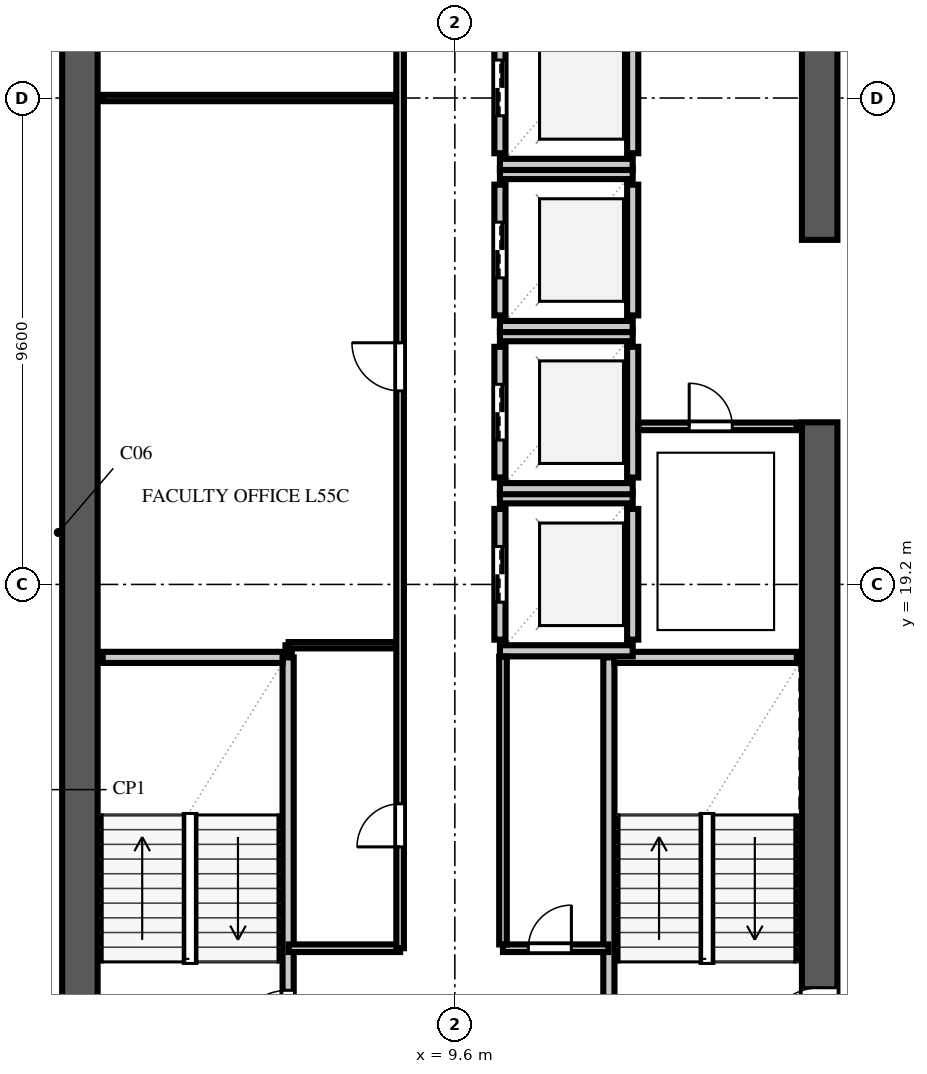
"""IFC4 building model, lengths in metres.
Left out: names, types, materials, properties, quantities, classifications, styles, units other than length and angle.
Written with IfcOpenShell. Run it as: python <this file> out.ifc"""

import sys

from ifc_helpers import new_model, si_unit, direction, frame, frame_2d, origin, place, context, subcontext, project, spatial, rectangle, extrude, element, fill, save


model = new_model("IFC4")
c1 = context("Model", 3, precision=1e-05, world=origin(), true_north=direction((0.0, 1.0)))
c2 = subcontext(c1, "Body", "Model", "MODEL_VIEW")
j1 = project(units=[si_unit("LENGTHUNIT", "METRE"), si_unit("PLANEANGLEUNIT", "RADIAN")], contexts=[c1])
p1 = place(None, origin())
s1 = spatial("IfcSite", under=j1, at=p1, CompositionType="ELEMENT")
p2 = place(p1, origin())
s2 = spatial("IfcBuilding", under=s1, at=p2, CompositionType="ELEMENT")
p3 = place(p2, frame((0.0, 0.0, 218.0)))
s3 = spatial("IfcBuildingStorey", under=s2, at=p3, CompositionType="ELEMENT", Elevation=218.0)
p4 = place(p3, frame((2.2, 9.25, 0.0), z_axis=(0.0, 0.0, 1.0), x_axis=(0.0, 1.0, 0.0)))
e1 = element("IfcWall", 1, at=p4, inside=s3, PredefinedType="SHEAR", context=c2, shape_type="SweptSolid", body=[
    extrude(rectangle(XDim=39.1, YDim=0.7, at=frame_2d((19.55, 0.0))), origin(), (0.0, 0.0, 1.0), 3.54),
])
p5 = place(p3, frame((16.8, 9.95, 0.0), z_axis=(0.0, 0.0, 1.0), x_axis=(0.0, 1.0, 0.0)))
e2 = element("IfcWall", 2, at=p5, inside=s3, PredefinedType="SHEAR", context=c2, shape_type="SweptSolid", body=[
    extrude(rectangle(XDim=12.45, YDim=0.7, at=frame_2d((6.225, 0.0))), origin(), (0.0, 0.0, 1.0), 3.54),
])
p6 = place(p5, frame((0.19, 0.0, 0.0)))
e3 = element("IfcOpeningElement", 3, at=p6, cuts=e2, PredefinedType="OPENING", context=c2, shape_type="SweptSolid", body=[
    extrude(rectangle(XDim=1.1, YDim=2.2, at=frame_2d((0.55, 1.1))), frame((0.0, 0.362, 0.0), z_axis=(0.0, -1.0, 0.0), x_axis=(1.0, 0.0, 0.0)), (0.0, 0.0, 1.0), 0.724),
])
p7 = place(p3, frame((16.8, 26.0, 0.0), z_axis=(0.0, 0.0, 1.0), x_axis=(0.0, 1.0, 0.0)))
e4 = element("IfcWall", 4, at=p7, inside=s3, PredefinedType="SHEAR", context=c2, shape_type="SweptSolid", body=[
    extrude(rectangle(XDim=7.8, YDim=0.7, at=frame_2d((3.9, 0.0))), origin(), (0.0, 0.0, 1.0), 3.54),
])
p8 = place(p3, frame((6.31, 9.95, 0.0), z_axis=(0.0, 0.0, 1.0), x_axis=(0.0, 1.0, 0.0)))
e5 = element("IfcWall", 5, at=p8, inside=s3, PredefinedType="SOLIDWALL", context=c2, shape_type="SweptSolid", body=[
    extrude(rectangle(XDim=7.81, YDim=0.22, at=frame_2d((3.905, 0.0))), origin(), (0.0, 0.0, 1.0), 3.54),
])
p9 = place(p8, frame((0.14, 0.0, 0.0)))
e6 = element("IfcOpeningElement", 6, at=p9, cuts=e5, PredefinedType="OPENING", context=c2, shape_type="SweptSolid", body=[
    extrude(rectangle(XDim=1.1, YDim=2.2, at=frame_2d((0.55, 1.1))), frame((0.0, 0.122, 0.0), z_axis=(0.0, -1.0, 0.0), x_axis=(1.0, 0.0, 0.0)), (0.0, 0.0, 1.0), 0.244),
])
p10 = place(p3, frame((2.65, 17.76, 0.0), z_axis=(0.0, 0.0, 1.0), x_axis=(1.0, 0.0, 0.0)))
e7 = element("IfcWall", 7, at=p10, inside=s3, PredefinedType="SOLIDWALL", context=c2, shape_type="SweptSolid", body=[
    extrude(rectangle(XDim=3.55, YDim=0.22, at=frame_2d((1.775, 0.0))), origin(), (0.0, 0.0, 1.0), 3.54),
])
p11 = place(p3, frame((12.64, 10.05, 0.0), z_axis=(0.0, 0.0, 1.0), x_axis=(0.0, 1.0, 0.0)))
e8 = element("IfcWall", 8, at=p11, inside=s3, PredefinedType="SOLIDWALL", context=c2, shape_type="SweptSolid", body=[
    extrude(rectangle(XDim=7.71, YDim=0.22, at=frame_2d((3.855, 0.0))), origin(), (0.0, 0.0, 1.0), 3.54),
])
p12 = place(p3, frame((12.75, 17.76, 0.0), z_axis=(0.0, 0.0, 1.0), x_axis=(1.0, 0.0, 0.0)))
e9 = element("IfcWall", 9, at=p12, inside=s3, PredefinedType="SOLIDWALL", context=c2, shape_type="SweptSolid", body=[
    extrude(rectangle(XDim=3.6, YDim=0.22, at=frame_2d((1.8, 0.0))), origin(), (0.0, 0.0, 1.0), 3.54),
])
p13 = place(p3, frame((10.49, 18.11, 0.0), z_axis=(0.0, 0.0, 1.0), x_axis=(0.0, 1.0, 0.0)))
e10 = element("IfcWall", 10, at=p13, inside=s3, PredefinedType="SOLIDWALL", context=c2, shape_type="SweptSolid", body=[
    extrude(rectangle(XDim=2.58, YDim=0.22, at=frame_2d((1.29, 0.0))), origin(), (0.0, 0.0, 1.0), 3.54),
])
p14 = place(p13, frame((0.74, 0.0, 0.0)))
e11 = element("IfcOpeningElement", 11, at=p14, cuts=e10, PredefinedType="OPENING", context=c2, shape_type="SweptSolid", body=[
    extrude(rectangle(XDim=1.1, YDim=2.2, at=frame_2d((0.55, 1.1))), frame((0.0, 0.122, 0.0), z_axis=(0.0, -1.0, 0.0), x_axis=(1.0, 0.0, 0.0)), (0.0, 0.0, 1.0), 0.244),
])
p15 = place(p3, frame((13.11, 18.11, 0.0), z_axis=(0.0, 0.0, 1.0), x_axis=(0.0, 1.0, 0.0)))
e12 = element("IfcWall", 12, at=p15, inside=s3, PredefinedType="SOLIDWALL", context=c2, shape_type="SweptSolid", body=[
    extrude(rectangle(XDim=2.58, YDim=0.22, at=frame_2d((1.29, 0.0))), origin(), (0.0, 0.0, 1.0), 3.54),
])
for number, where, z_axis, x_axis in (
    (13, (10.49, 17.89, 0.0), (0.0, 0.0, 1.0), (1.0, 0.0, 0.0)),
    (14, (10.49, 20.91, 0.0), (0.0, 0.0, 1.0), (1.0, 0.0, 0.0)),
):
    element("IfcWall", number, at=place(p3, frame(where, z_axis=z_axis, x_axis=x_axis)), inside=s3, PredefinedType="SOLIDWALL", context=c2, shape_type="SweptSolid", body=[
        extrude(rectangle(XDim=2.62, YDim=0.22, at=frame_2d((1.31, 0.0))), origin(), (0.0, 0.0, 1.0), 3.54),
    ])
p16 = place(p3, frame((10.49, 21.31, 0.0), z_axis=(0.0, 0.0, 1.0), x_axis=(0.0, 1.0, 0.0)))
e15 = element("IfcWall", 15, at=p16, inside=s3, PredefinedType="SOLIDWALL", context=c2, shape_type="SweptSolid", body=[
    extrude(rectangle(XDim=2.58, YDim=0.22, at=frame_2d((1.29, 0.0))), origin(), (0.0, 0.0, 1.0), 3.54),
])
p17 = place(p16, frame((0.74, 0.0, 0.0)))
e16 = element("IfcOpeningElement", 16, at=p17, cuts=e15, PredefinedType="OPENING", context=c2, shape_type="SweptSolid", body=[
    extrude(rectangle(XDim=1.1, YDim=2.2, at=frame_2d((0.55, 1.1))), frame((0.0, 0.122, 0.0), z_axis=(0.0, -1.0, 0.0), x_axis=(1.0, 0.0, 0.0)), (0.0, 0.0, 1.0), 0.244),
])
p18 = place(p3, frame((13.11, 21.31, 0.0), z_axis=(0.0, 0.0, 1.0), x_axis=(0.0, 1.0, 0.0)))
e17 = element("IfcWall", 17, at=p18, inside=s3, PredefinedType="SOLIDWALL", context=c2, shape_type="SweptSolid", body=[
    extrude(rectangle(XDim=2.58, YDim=0.22, at=frame_2d((1.29, 0.0))), origin(), (0.0, 0.0, 1.0), 3.54),
])
for number, where, z_axis, x_axis in (
    (18, (10.49, 21.09, 0.0), (0.0, 0.0, 1.0), (1.0, 0.0, 0.0)),
    (19, (10.49, 24.11, 0.0), (0.0, 0.0, 1.0), (1.0, 0.0, 0.0)),
):
    element("IfcWall", number, at=place(p3, frame(where, z_axis=z_axis, x_axis=x_axis)), inside=s3, PredefinedType="SOLIDWALL", context=c2, shape_type="SweptSolid", body=[
        extrude(rectangle(XDim=2.62, YDim=0.22, at=frame_2d((1.31, 0.0))), origin(), (0.0, 0.0, 1.0), 3.54),
    ])
p19 = place(p3, frame((10.49, 24.51, 0.0), z_axis=(0.0, 0.0, 1.0), x_axis=(0.0, 1.0, 0.0)))
e20 = element("IfcWall", 20, at=p19, inside=s3, PredefinedType="SOLIDWALL", context=c2, shape_type="SweptSolid", body=[
    extrude(rectangle(XDim=2.58, YDim=0.22, at=frame_2d((1.29, 0.0))), origin(), (0.0, 0.0, 1.0), 3.54),
])
p20 = place(p19, frame((0.74, 0.0, 0.0)))
e21 = element("IfcOpeningElement", 21, at=p20, cuts=e20, PredefinedType="OPENING", context=c2, shape_type="SweptSolid", body=[
    extrude(rectangle(XDim=1.1, YDim=2.2, at=frame_2d((0.55, 1.1))), frame((0.0, 0.122, 0.0), z_axis=(0.0, -1.0, 0.0), x_axis=(1.0, 0.0, 0.0)), (0.0, 0.0, 1.0), 0.244),
])
p21 = place(p3, frame((13.11, 24.51, 0.0), z_axis=(0.0, 0.0, 1.0), x_axis=(0.0, 1.0, 0.0)))
e22 = element("IfcWall", 22, at=p21, inside=s3, PredefinedType="SOLIDWALL", context=c2, shape_type="SweptSolid", body=[
    extrude(rectangle(XDim=2.58, YDim=0.22, at=frame_2d((1.29, 0.0))), origin(), (0.0, 0.0, 1.0), 3.54),
])
for number, where, z_axis, x_axis in (
    (23, (10.49, 24.29, 0.0), (0.0, 0.0, 1.0), (1.0, 0.0, 0.0)),
    (24, (10.49, 27.31, 0.0), (0.0, 0.0, 1.0), (1.0, 0.0, 0.0)),
):
    element("IfcWall", number, at=place(p3, frame(where, z_axis=z_axis, x_axis=x_axis)), inside=s3, PredefinedType="SOLIDWALL", context=c2, shape_type="SweptSolid", body=[
        extrude(rectangle(XDim=2.62, YDim=0.22, at=frame_2d((1.31, 0.0))), origin(), (0.0, 0.0, 1.0), 3.54),
    ])
p22 = place(p3, frame((10.49, 27.71, 0.0), z_axis=(0.0, 0.0, 1.0), x_axis=(0.0, 1.0, 0.0)))
e25 = element("IfcWall", 25, at=p22, inside=s3, PredefinedType="SOLIDWALL", context=c2, shape_type="SweptSolid", body=[
    extrude(rectangle(XDim=2.58, YDim=0.22, at=frame_2d((1.29, 0.0))), origin(), (0.0, 0.0, 1.0), 3.54),
])
p23 = place(p22, frame((0.74, 0.0, 0.0)))
e26 = element("IfcOpeningElement", 26, at=p23, cuts=e25, PredefinedType="OPENING", context=c2, shape_type="SweptSolid", body=[
    extrude(rectangle(XDim=1.1, YDim=2.2, at=frame_2d((0.55, 1.1))), frame((0.0, 0.122, 0.0), z_axis=(0.0, -1.0, 0.0), x_axis=(1.0, 0.0, 0.0)), (0.0, 0.0, 1.0), 0.244),
])
p24 = place(p3, frame((13.11, 27.71, 0.0), z_axis=(0.0, 0.0, 1.0), x_axis=(0.0, 1.0, 0.0)))
e27 = element("IfcWall", 27, at=p24, inside=s3, PredefinedType="SOLIDWALL", context=c2, shape_type="SweptSolid", body=[
    extrude(rectangle(XDim=2.58, YDim=0.22, at=frame_2d((1.29, 0.0))), origin(), (0.0, 0.0, 1.0), 3.54),
])
p25 = place(p3, frame((10.49, 27.49, 0.0), z_axis=(0.0, 0.0, 1.0), x_axis=(1.0, 0.0, 0.0)))
e28 = element("IfcWall", 28, at=p25, inside=s3, PredefinedType="SOLIDWALL", context=c2, shape_type="SweptSolid", body=[
    extrude(rectangle(XDim=2.62, YDim=0.22, at=frame_2d((1.31, 0.0))), origin(), (0.0, 0.0, 1.0), 3.54),
])
p26 = place(p3, frame((10.55, 12.02, 0.0), z_axis=(0.0, 0.0, 1.0), x_axis=(1.0, 0.0, 0.0)))
e29 = element("IfcWall", 29, at=p26, inside=s3, PredefinedType="PARTITIONING", context=c2, shape_type="SweptSolid", body=[
    extrude(rectangle(XDim=2.08, YDim=0.15, at=frame_2d((1.04, 0.0))), origin(), (0.0, 0.0, 1.0), 3.54),
])
p27 = place(p26, frame((0.5, 0.0, 0.0)))
e30 = element("IfcOpeningElement", 30, at=p27, cuts=e29, PredefinedType="OPENING", context=c2, shape_type="SweptSolid", body=[
    extrude(rectangle(XDim=0.85, YDim=2.1, at=frame_2d((0.425, 1.05))), frame((0.0, 0.087, 0.0), z_axis=(0.0, -1.0, 0.0), x_axis=(1.0, 0.0, 0.0)), (0.0, 0.0, 1.0), 0.174),
])
p28 = place(p3, frame((10.55, 12.095, 0.0), z_axis=(0.0, 0.0, 1.0), x_axis=(0.0, 1.0, 0.0)))
e31 = element("IfcWall", 31, at=p28, inside=s3, PredefinedType="PARTITIONING", context=c2, shape_type="SweptSolid", body=[
    extrude(rectangle(XDim=5.68, YDim=0.15, at=frame_2d((2.84, 0.0))), origin(), (0.0, 0.0, 1.0), 3.54),
])
p29 = place(p3, frame((13.225, 22.32, 0.0), z_axis=(0.0, 0.0, 1.0), x_axis=(1.0, 0.0, 0.0)))
e32 = element("IfcWall", 32, at=p29, inside=s3, PredefinedType="PARTITIONING", context=c2, shape_type="SweptSolid", body=[
    extrude(rectangle(XDim=3.12, YDim=0.15, at=frame_2d((1.56, 0.0))), origin(), (0.0, 0.0, 1.0), 3.54),
])
p30 = place(p29, frame((1.0, 0.0, 0.0)))
e33 = element("IfcOpeningElement", 33, at=p30, cuts=e32, PredefinedType="OPENING", context=c2, shape_type="SweptSolid", body=[
    extrude(rectangle(XDim=0.85, YDim=2.1, at=frame_2d((0.425, 1.05))), frame((0.0, 0.087, 0.0), z_axis=(0.0, -1.0, 0.0), x_axis=(1.0, 0.0, 0.0)), (0.0, 0.0, 1.0), 0.174),
])
p31 = place(p3, frame((6.32, 12.02, 0.0), z_axis=(0.0, 0.0, 1.0), x_axis=(1.0, 0.0, 0.0)))
e34 = element("IfcWall", 34, at=p31, inside=s3, PredefinedType="PARTITIONING", context=c2, shape_type="SweptSolid", body=[
    extrude(rectangle(XDim=2.2, YDim=0.15, at=frame_2d((1.1, 0.0))), origin(), (0.0, 0.0, 1.0), 3.54),
])
p32 = place(p3, frame((6.32, 17.8, 0.0), z_axis=(0.0, 0.0, 1.0), x_axis=(0.0, 1.0, 0.0)))
e35 = element("IfcWall", 35, at=p32, inside=s3, PredefinedType="PARTITIONING", context=c2, shape_type="SweptSolid", body=[
    extrude(rectangle(XDim=0.2, YDim=0.125, at=frame_2d((0.1, 0.0))), origin(), (0.0, 0.0, 1.0), 3.54),
])
p33 = place(p3, frame((6.32, 18.0, 0.0), z_axis=(0.0, 0.0, 1.0), x_axis=(1.0, 0.0, 0.0)))
e36 = element("IfcWall", 36, at=p33, inside=s3, PredefinedType="PARTITIONING", context=c2, shape_type="SweptSolid", body=[
    extrude(rectangle(XDim=2.2, YDim=0.125, at=frame_2d((1.1, 0.0))), origin(), (0.0, 0.0, 1.0), 3.54),
])
p34 = place(p3, frame((2.65, 28.8, 0.0), z_axis=(0.0, 0.0, 1.0), x_axis=(1.0, 0.0, 0.0)))
e37 = element("IfcWall", 37, at=p34, inside=s3, PredefinedType="PARTITIONING", context=c2, shape_type="SweptSolid", body=[
    extrude(rectangle(XDim=5.87, YDim=0.125, at=frame_2d((2.935, 0.0))), origin(), (0.0, 0.0, 1.0), 3.54),
])
p35 = place(p3, frame((8.52, 12.02, 0.0), z_axis=(0.0, 0.0, 1.0), x_axis=(0.0, 1.0, 0.0)))
e38 = element("IfcWall", 38, at=p35, inside=s3, PredefinedType="PARTITIONING", context=c2, shape_type="SweptSolid", body=[
    extrude(rectangle(XDim=24.76, YDim=0.15, at=frame_2d((12.38, 0.0))), origin(), (0.0, 0.0, 1.0), 3.54),
])
p36 = place(p35, frame((2.0, 0.0, 0.0)))
e39 = element("IfcOpeningElement", 39, at=p36, cuts=e38, PredefinedType="OPENING", context=c2, shape_type="SweptSolid", body=[
    extrude(rectangle(XDim=0.85, YDim=2.1, at=frame_2d((0.425, 1.05))), frame((0.0, 0.087, 0.0), z_axis=(0.0, -1.0, 0.0), x_axis=(1.0, 0.0, 0.0)), (0.0, 0.0, 1.0), 0.174),
])
p37 = place(p35, frame((11.0, 0.0, 0.0)))
e40 = element("IfcOpeningElement", 40, at=p37, cuts=e38, PredefinedType="OPENING", context=c2, shape_type="SweptSolid", body=[
    extrude(rectangle(XDim=0.95, YDim=2.15, at=frame_2d((0.475, 1.075))), frame((0.0, 0.087, 0.0), z_axis=(0.0, -1.0, 0.0), x_axis=(1.0, 0.0, 0.0)), (0.0, 0.0, 1.0), 0.174),
])
p38 = place(p35, frame((18.0, 0.0, 0.0)))
e41 = element("IfcOpeningElement", 41, at=p38, cuts=e38, PredefinedType="OPENING", context=c2, shape_type="SweptSolid", body=[
    extrude(rectangle(XDim=0.95, YDim=2.15, at=frame_2d((0.475, 1.075))), frame((0.0, 0.087, 0.0), z_axis=(0.0, -1.0, 0.0), x_axis=(1.0, 0.0, 0.0)), (0.0, 0.0, 1.0), 0.174),
])
p39 = place(p9, origin())
e42 = element("IfcDoor", 42, at=p39, inside=s3, OperationType="SINGLE_SWING_LEFT", PredefinedType="DOOR", context=c2, shape_type="SweptSolid", body=[
    extrude(rectangle(XDim=1.1, YDim=2.2, at=frame_2d((0.55, 1.1))), frame((0.0, 0.025, 0.0), z_axis=(0.0, -1.0, 0.0), x_axis=(1.0, 0.0, 0.0)), (0.0, 0.0, 1.0), 0.05),
])
fill(e6, e42)
p40 = place(p6, origin())
e43 = element("IfcDoor", 43, at=p40, inside=s3, OperationType="SINGLE_SWING_LEFT", PredefinedType="DOOR", context=c2, shape_type="SweptSolid", body=[
    extrude(rectangle(XDim=1.1, YDim=2.2, at=frame_2d((0.55, 1.1))), frame((0.0, 0.025, 0.0), z_axis=(0.0, -1.0, 0.0), x_axis=(1.0, 0.0, 0.0)), (0.0, 0.0, 1.0), 0.05),
])
fill(e3, e43)
p41 = place(p14, origin())
e44 = element("IfcDoor", 44, at=p41, inside=s3, OperationType="DOUBLE_DOOR_SLIDING", PredefinedType="DOOR", context=c2, shape_type="SweptSolid", body=[
    extrude(rectangle(XDim=1.1, YDim=2.2, at=frame_2d((0.55, 1.1))), frame((0.0, 0.025, 0.0), z_axis=(0.0, -1.0, 0.0), x_axis=(1.0, 0.0, 0.0)), (0.0, 0.0, 1.0), 0.05),
])
fill(e11, e44)
p42 = place(p17, origin())
e45 = element("IfcDoor", 45, at=p42, inside=s3, OperationType="DOUBLE_DOOR_SLIDING", PredefinedType="DOOR", context=c2, shape_type="SweptSolid", body=[
    extrude(rectangle(XDim=1.1, YDim=2.2, at=frame_2d((0.55, 1.1))), frame((0.0, 0.025, 0.0), z_axis=(0.0, -1.0, 0.0), x_axis=(1.0, 0.0, 0.0)), (0.0, 0.0, 1.0), 0.05),
])
fill(e16, e45)
p43 = place(p20, origin())
e46 = element("IfcDoor", 46, at=p43, inside=s3, OperationType="DOUBLE_DOOR_SLIDING", PredefinedType="DOOR", context=c2, shape_type="SweptSolid", body=[
    extrude(rectangle(XDim=1.1, YDim=2.2, at=frame_2d((0.55, 1.1))), frame((0.0, 0.025, 0.0), z_axis=(0.0, -1.0, 0.0), x_axis=(1.0, 0.0, 0.0)), (0.0, 0.0, 1.0), 0.05),
])
fill(e21, e46)
p44 = place(p23, origin())
e47 = element("IfcDoor", 47, at=p44, inside=s3, OperationType="DOUBLE_DOOR_SLIDING", PredefinedType="DOOR", context=c2, shape_type="SweptSolid", body=[
    extrude(rectangle(XDim=1.1, YDim=2.2, at=frame_2d((0.55, 1.1))), frame((0.0, 0.025, 0.0), z_axis=(0.0, -1.0, 0.0), x_axis=(1.0, 0.0, 0.0)), (0.0, 0.0, 1.0), 0.05),
])
fill(e26, e47)
p45 = place(p27, origin())
e48 = element("IfcDoor", 48, at=p45, inside=s3, OperationType="SINGLE_SWING_RIGHT", PredefinedType="DOOR", context=c2, shape_type="SweptSolid", body=[
    extrude(rectangle(XDim=0.85, YDim=2.1, at=frame_2d((0.425, 1.05))), frame((0.0, 0.025, 0.0), z_axis=(0.0, -1.0, 0.0), x_axis=(1.0, 0.0, 0.0)), (0.0, 0.0, 1.0), 0.05),
])
fill(e30, e48)
p46 = place(p30, origin())
e49 = element("IfcDoor", 49, at=p46, inside=s3, OperationType="SINGLE_SWING_LEFT", PredefinedType="DOOR", context=c2, shape_type="SweptSolid", body=[
    extrude(rectangle(XDim=0.85, YDim=2.1, at=frame_2d((0.425, 1.05))), frame((0.0, 0.025, 0.0), z_axis=(0.0, -1.0, 0.0), x_axis=(1.0, 0.0, 0.0)), (0.0, 0.0, 1.0), 0.05),
])
fill(e33, e49)
p47 = place(p36, origin())
e50 = element("IfcDoor", 50, at=p47, inside=s3, OperationType="SINGLE_SWING_LEFT", PredefinedType="DOOR", context=c2, shape_type="SweptSolid", body=[
    extrude(rectangle(XDim=0.85, YDim=2.1, at=frame_2d((0.425, 1.05))), frame((0.0, 0.025, 0.0), z_axis=(0.0, -1.0, 0.0), x_axis=(1.0, 0.0, 0.0)), (0.0, 0.0, 1.0), 0.05),
])
fill(e39, e50)
p48 = place(p37, origin())
e51 = element("IfcDoor", 51, at=p48, inside=s3, OperationType="SINGLE_SWING_RIGHT", PredefinedType="DOOR", context=c2, shape_type="SweptSolid", body=[
    extrude(rectangle(XDim=0.95, YDim=2.15, at=frame_2d((0.475, 1.075))), frame((0.0, 0.025, 0.0), z_axis=(0.0, -1.0, 0.0), x_axis=(1.0, 0.0, 0.0)), (0.0, 0.0, 1.0), 0.05),
])
fill(e40, e51)
save(model, sys.argv[1])
